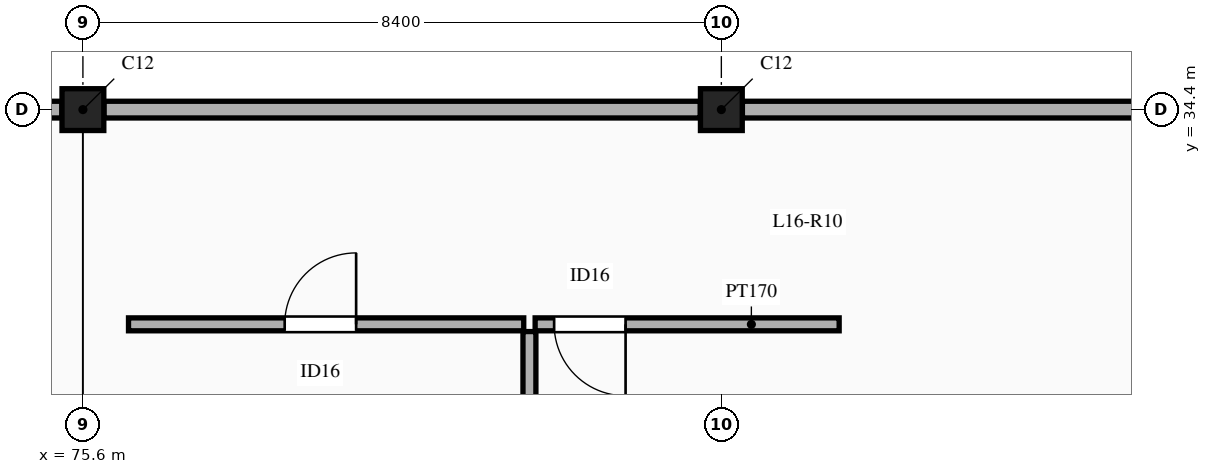
"""IFC4 building model, lengths in metres.
Left out: names, types, materials, properties, quantities, classifications, styles, units other than length and angle.
Written with IfcOpenShell. Run it as: python <this file> out.ifc"""

import sys

from ifc_helpers import new_model, si_unit, direction, frame, frame_2d, origin, origin_2d, place, context, subcontext, project, spatial, rectangle, extrude, element, fill, save


model = new_model("IFC4")
c1 = context("Model", 3, precision=1e-05, world=origin(), true_north=direction((0.0, 1.0)))
c2 = subcontext(c1, "Body", "Model", "MODEL_VIEW")
j1 = project(units=[si_unit("LENGTHUNIT", "METRE"), si_unit("PLANEANGLEUNIT", "RADIAN")], contexts=[c1])
p1 = place(None, origin())
s1 = spatial("IfcSite", under=j1, at=p1, CompositionType="ELEMENT")
p2 = place(p1, origin())
s2 = spatial("IfcBuilding", under=s1, at=p2, CompositionType="ELEMENT")
p3 = place(p2, frame((0.0, 0.0, 73.5)))
s3 = spatial("IfcBuildingStorey", under=s2, at=p3, CompositionType="ELEMENT", Elevation=73.5)
for number, where, z_axis, x_axis in (
    (1, (75.6, 34.4, 0.0), (0.0, 0.0, 1.0), (1.0, 0.0, 0.0)),
    (2, (84.0, 34.4, 0.0), (0.0, 0.0, 1.0), (1.0, 0.0, 0.0)),
):
    element("IfcColumn", number, at=place(p3, frame(where, z_axis=z_axis, x_axis=x_axis)), inside=s3, PredefinedType="COLUMN", context=c2, shape_type="SweptSolid", body=[
        extrude(rectangle(XDim=0.55, YDim=0.55, at=origin_2d()), origin(), (0.0, 0.0, 1.0), 4.5),
    ])
p4 = place(p3, frame((67.402, 34.4, 0.0), z_axis=(0.0, 0.0, 1.0), x_axis=(1.0, 0.0, 0.0)))
e3 = element("IfcWall", 3, at=p4, inside=s3, PredefinedType="USERDEFINED", context=c2, shape_type="SweptSolid", body=[
    extrude(rectangle(XDim=7.921, YDim=0.22, at=frame_2d((3.96, 0.0))), origin(), (0.0, 0.0, 1.0), 3.55),
])
p5 = place(p3, frame((75.877, 34.4, 0.0), z_axis=(0.0, 0.0, 1.0), x_axis=(1.0, 0.0, 0.0)))
e4 = element("IfcWall", 4, at=p5, inside=s3, PredefinedType="USERDEFINED", context=c2, shape_type="SweptSolid", body=[
    extrude(rectangle(XDim=7.846, YDim=0.22, at=frame_2d((3.923, 0.0))), origin(), (0.0, 0.0, 1.0), 3.55),
])
p6 = place(p3, frame((84.277, 34.4, 0.0), z_axis=(0.0, 0.0, 1.0), x_axis=(1.0, 0.0, 0.0)))
e5 = element("IfcWall", 5, at=p6, inside=s3, PredefinedType="USERDEFINED", context=c2, shape_type="SweptSolid", body=[
    extrude(rectangle(XDim=7.921, YDim=0.22, at=frame_2d((3.96, 0.0))), origin(), (0.0, 0.0, 1.0), 3.55),
])
p7 = place(p3, frame((81.55, 31.575, 0.0), z_axis=(0.0, 0.0, 1.0), x_axis=(1.0, 0.0, 0.0)))
e6 = element("IfcWall", 6, at=p7, inside=s3, PredefinedType="PARTITIONING", context=c2, shape_type="SweptSolid", body=[
    extrude(rectangle(XDim=4.0, YDim=0.17, at=frame_2d((2.0, 0.0))), origin(), (0.0, 0.0, 1.0), 3.45),
])
p8 = place(p7, frame((0.25, 0.0, 0.0)))
e7 = element("IfcOpeningElement", 7, at=p8, cuts=e6, PredefinedType="OPENING", context=c2, shape_type="SweptSolid", body=[
    extrude(rectangle(XDim=0.94, YDim=2.1, at=frame_2d((0.47, 1.05))), frame((0.0, 0.095, 0.0), z_axis=(0.0, -1.0, 0.0), x_axis=(1.0, 0.0, 0.0)), (0.0, 0.0, 1.0), 0.19),
])
p9 = place(p3, frame((76.2, 31.575, 0.0), z_axis=(0.0, 0.0, 1.0), x_axis=(1.0, 0.0, 0.0)))
e8 = element("IfcWall", 8, at=p9, inside=s3, PredefinedType="PARTITIONING", context=c2, shape_type="SweptSolid", body=[
    extrude(rectangle(XDim=5.2, YDim=0.17, at=frame_2d((2.6, 0.0))), origin(), (0.0, 0.0, 1.0), 3.45),
])
p10 = place(p9, frame((2.055, 0.0, 0.0)))
e9 = element("IfcOpeningElement", 9, at=p10, cuts=e8, PredefinedType="OPENING", context=c2, shape_type="SweptSolid", body=[
    extrude(rectangle(XDim=0.94, YDim=2.1, at=frame_2d((0.47, 1.05))), frame((0.0, 0.095, 0.0), z_axis=(0.0, -1.0, 0.0), x_axis=(1.0, 0.0, 0.0)), (0.0, 0.0, 1.0), 0.19),
])
p11 = place(p3, frame((81.475, 29.0, 0.0), z_axis=(0.0, 0.0, 1.0), x_axis=(0.0, 1.0, 0.0)))
e10 = element("IfcWall", 10, at=p11, inside=s3, PredefinedType="PARTITIONING", context=c2, shape_type="SweptSolid", body=[
    extrude(rectangle(XDim=2.48, YDim=0.17, at=frame_2d((1.24, 0.0))), origin(), (0.0, 0.0, 1.0), 3.45),
])
p12 = place(p8, frame((0.94, 0.0, 0.0), z_axis=(0.0, 0.0, 1.0), x_axis=(-1.0, 0.0, 0.0)))
e11 = element("IfcDoor", 11, at=p12, inside=s3, OperationType="SINGLE_SWING_LEFT", PredefinedType="DOOR", context=c2, shape_type="SweptSolid", body=[
    extrude(rectangle(XDim=0.94, YDim=2.1, at=frame_2d((0.47, 1.05))), frame((0.0, 0.025, 0.0), z_axis=(0.0, -1.0, 0.0), x_axis=(1.0, 0.0, 0.0)), (0.0, 0.0, 1.0), 0.05),
])
fill(e7, e11)
p13 = place(p10, origin())
e12 = element("IfcDoor", 12, at=p13, inside=s3, OperationType="SINGLE_SWING_RIGHT", PredefinedType="DOOR", context=c2, shape_type="SweptSolid", body=[
    extrude(rectangle(XDim=0.94, YDim=2.1, at=frame_2d((0.47, 1.05))), frame((0.0, 0.025, 0.0), z_axis=(0.0, -1.0, 0.0), x_axis=(1.0, 0.0, 0.0)), (0.0, 0.0, 1.0), 0.05),
])
fill(e9, e12)
save(model, sys.argv[1])
